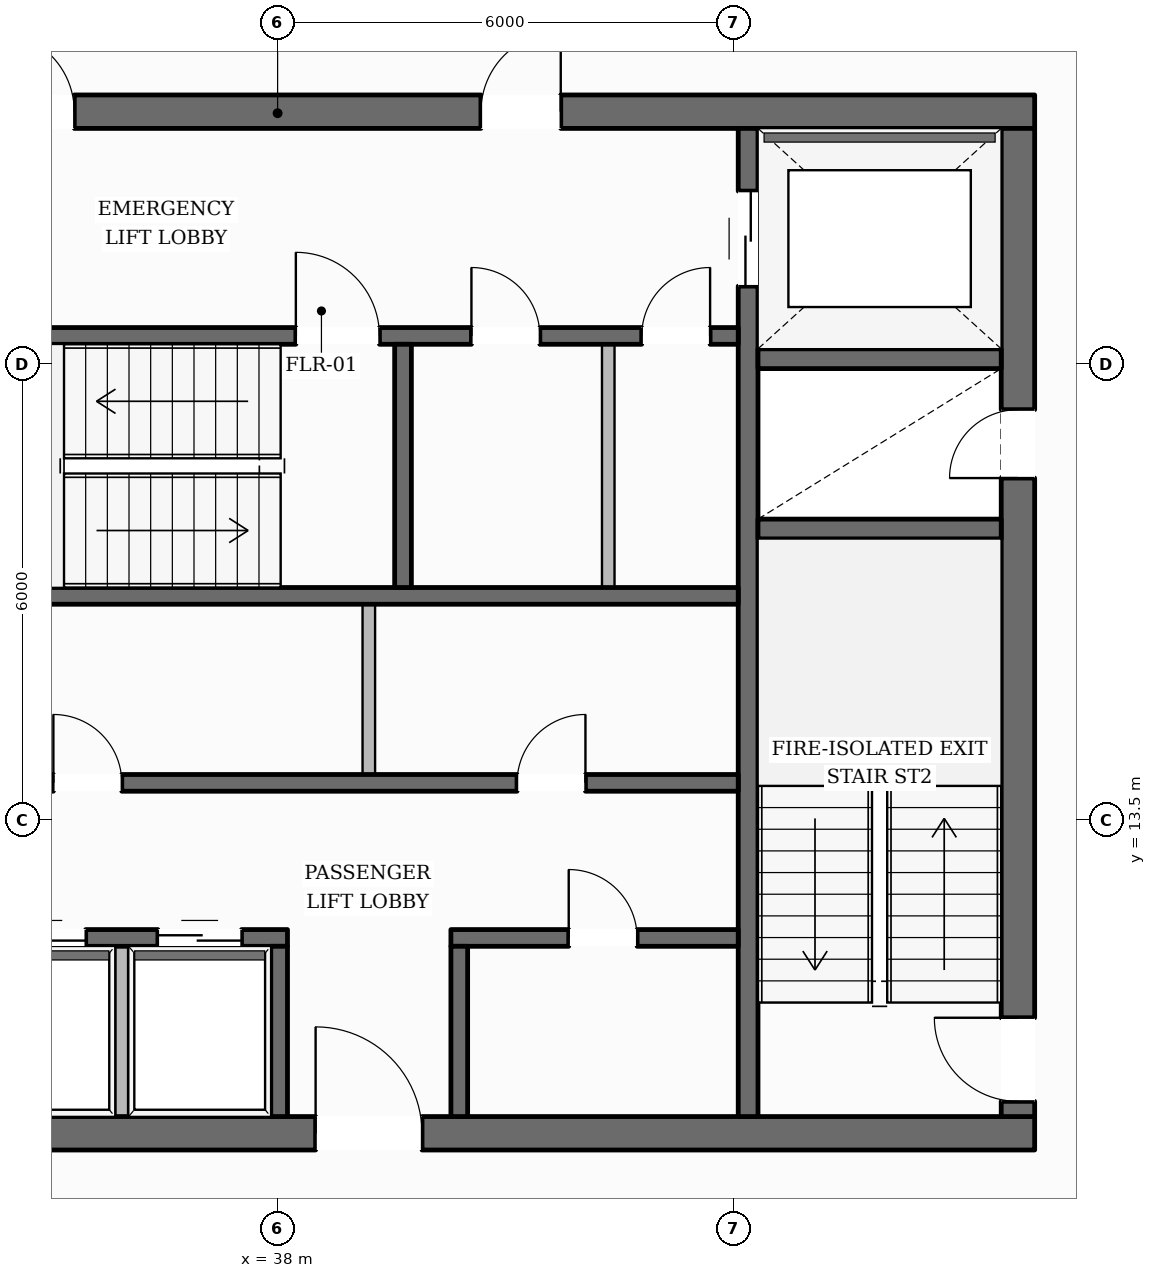
"""IFC4 building model, lengths in metres.
Left out: names, types, materials, properties, quantities, classifications, styles, units other than length and angle.
Written with IfcOpenShell. Run it as: python <this file> out.ifc"""

import sys

from ifc_helpers import new_model, si_unit, direction, frame, frame_2d, origin, place, context, subcontext, project, spatial, rectangle, extrude, element, fill, save


model = new_model("IFC4")
c1 = context("Model", 3, precision=1e-05, world=origin(), true_north=direction((0.0, 1.0)))
c2 = subcontext(c1, "Body", "Model", "MODEL_VIEW")
j1 = project(units=[si_unit("LENGTHUNIT", "METRE"), si_unit("PLANEANGLEUNIT", "RADIAN")], contexts=[c1])
p1 = place(None, origin())
s1 = spatial("IfcSite", under=j1, at=p1, CompositionType="ELEMENT")
p2 = place(p1, origin())
s2 = spatial("IfcBuilding", under=s1, at=p2, CompositionType="ELEMENT")
p3 = place(p2, frame((0.0, 0.0, 199.65)))
s3 = spatial("IfcBuildingStorey", under=s2, at=p3, CompositionType="ELEMENT", Elevation=199.65)
p4 = place(p3, frame((28.04, 9.38, 0.0), z_axis=(0.0, 0.0, 1.0), x_axis=(1.0, 0.0, 0.0)))
e1 = element("IfcWall", 1, at=p4, inside=s3, PredefinedType="SOLIDWALL", context=c2, shape_type="SweptSolid", body=[
    extrude(rectangle(XDim=19.92, YDim=0.44, at=frame_2d((9.96, 0.0))), origin(), (0.0, 0.0, 1.0), 3.6),
])
p5 = place(p4, frame((10.46, 0.0, 0.0)))
e2 = element("IfcOpeningElement", 2, at=p5, cuts=e1, PredefinedType="OPENING", context=c2, shape_type="SweptSolid", body=[
    extrude(rectangle(XDim=1.4, YDim=2.2, at=frame_2d((0.7, 1.1))), frame((0.0, 0.23, 0.0), z_axis=(0.0, -1.0, 0.0), x_axis=(1.0, 0.0, 0.0)), (0.0, 0.0, 1.0), 0.46),
])
p6 = place(p3, frame((28.04, 22.82, 0.0), z_axis=(0.0, 0.0, 1.0), x_axis=(1.0, 0.0, 0.0)))
e3 = element("IfcWall", 3, at=p6, inside=s3, PredefinedType="SOLIDWALL", context=c2, shape_type="SweptSolid", body=[
    extrude(rectangle(XDim=19.92, YDim=0.44, at=frame_2d((9.96, 0.0))), origin(), (0.0, 0.0, 1.0), 3.6),
])
p7 = place(p6, frame((6.235, 0.0, 0.0)))
e4 = element("IfcOpeningElement", 4, at=p7, cuts=e3, PredefinedType="OPENING", context=c2, shape_type="SweptSolid", body=[
    extrude(rectangle(XDim=1.05, YDim=2.15, at=frame_2d((0.525, 1.075))), frame((0.0, 0.23, 0.0), z_axis=(0.0, -1.0, 0.0), x_axis=(1.0, 0.0, 0.0)), (0.0, 0.0, 1.0), 0.46),
])
p8 = place(p6, frame((12.635, 0.0, 0.0)))
e5 = element("IfcOpeningElement", 5, at=p8, cuts=e3, PredefinedType="OPENING", context=c2, shape_type="SweptSolid", body=[
    extrude(rectangle(XDim=1.05, YDim=2.15, at=frame_2d((0.525, 1.075))), frame((0.0, 0.23, 0.0), z_axis=(0.0, -1.0, 0.0), x_axis=(1.0, 0.0, 0.0)), (0.0, 0.0, 1.0), 0.46),
])
p9 = place(p3, frame((47.74, 9.6, 0.0), z_axis=(0.0, 0.0, 1.0), x_axis=(0.0, 1.0, 0.0)))
e6 = element("IfcWall", 6, at=p9, inside=s3, PredefinedType="SOLIDWALL", context=c2, shape_type="SweptSolid", body=[
    extrude(rectangle(XDim=13.0, YDim=0.44, at=frame_2d((6.5, 0.0))), origin(), (0.0, 0.0, 1.0), 3.6),
])
p10 = place(p9, frame((0.2, 0.0, 0.0)))
e7 = element("IfcOpeningElement", 7, at=p10, cuts=e6, PredefinedType="OPENING", context=c2, shape_type="SweptSolid", body=[
    extrude(rectangle(XDim=1.1, YDim=2.15, at=frame_2d((0.55, 1.075))), frame((0.0, 0.23, 0.0), z_axis=(0.0, -1.0, 0.0), x_axis=(1.0, 0.0, 0.0)), (0.0, 0.0, 1.0), 0.46),
])
p11 = place(p9, frame((8.4, 0.0, 0.0)))
e8 = element("IfcOpeningElement", 8, at=p11, cuts=e6, PredefinedType="OPENING", context=c2, shape_type="SweptSolid", body=[
    extrude(rectangle(XDim=0.9, YDim=2.1, at=frame_2d((0.45, 1.05))), frame((0.0, 0.23, 0.0), z_axis=(0.0, -1.0, 0.0), x_axis=(1.0, 0.0, 0.0)), (0.0, 0.0, 1.0), 0.46),
])
p12 = place(p3, frame((44.19, 9.6, 0.0), z_axis=(0.0, 0.0, 1.0), x_axis=(0.0, 1.0, 0.0)))
e9 = element("IfcWall", 9, at=p12, inside=s3, PredefinedType="SHEAR", context=c2, shape_type="SweptSolid", body=[
    extrude(rectangle(XDim=13.0, YDim=0.26, at=frame_2d((6.5, 0.0))), origin(), (0.0, 0.0, 1.0), 3.6),
])
p13 = place(p12, frame((10.925, 0.0, 0.0)))
e10 = element("IfcOpeningElement", 10, at=p13, cuts=e9, PredefinedType="OPENING", context=c2, shape_type="SweptSolid", body=[
    extrude(rectangle(XDim=1.25, YDim=2.25, at=frame_2d((0.625, 1.125))), frame((0.0, 0.14, 0.0), z_axis=(0.0, -1.0, 0.0), x_axis=(1.0, 0.0, 0.0)), (0.0, 0.0, 1.0), 0.28),
])
for number, where, z_axis, x_axis in (
    (11, (44.32, 17.33, 0.0), (0.0, 0.0, 1.0), (1.0, 0.0, 0.0)),
    (12, (44.32, 19.57, 0.0), (0.0, 0.0, 1.0), (1.0, 0.0, 0.0)),
):
    element("IfcWall", number, at=place(p3, frame(where, z_axis=z_axis, x_axis=x_axis)), inside=s3, PredefinedType="SHEAR", context=c2, shape_type="SweptSolid", body=[
        extrude(rectangle(XDim=3.2, YDim=0.26, at=frame_2d((1.6, 0.0))), origin(), (0.0, 0.0, 1.0), 3.6),
    ])
p14 = place(p3, frame((31.94, 19.87, 0.0), z_axis=(0.0, 0.0, 1.0), x_axis=(1.0, 0.0, 0.0)))
e13 = element("IfcWall", 13, at=p14, inside=s3, PredefinedType="SOLIDWALL", context=c2, shape_type="SweptSolid", body=[
    extrude(rectangle(XDim=12.12, YDim=0.22, at=frame_2d((6.06, 0.0))), origin(), (0.0, 0.0, 1.0), 3.6),
])
p15 = place(p14, frame((6.3, 0.0, 0.0)))
e14 = element("IfcOpeningElement", 14, at=p15, cuts=e13, PredefinedType="OPENING", context=c2, shape_type="SweptSolid", body=[
    extrude(rectangle(XDim=1.1, YDim=2.15, at=frame_2d((0.55, 1.075))), frame((0.0, 0.12, 0.0), z_axis=(0.0, -1.0, 0.0), x_axis=(1.0, 0.0, 0.0)), (0.0, 0.0, 1.0), 0.24),
])
p16 = place(p14, frame((8.61, 0.0, 0.0)))
e15 = element("IfcOpeningElement", 15, at=p16, cuts=e13, PredefinedType="OPENING", context=c2, shape_type="SweptSolid", body=[
    extrude(rectangle(XDim=0.9, YDim=2.1, at=frame_2d((0.45, 1.05))), frame((0.0, 0.12, 0.0), z_axis=(0.0, -1.0, 0.0), x_axis=(1.0, 0.0, 0.0)), (0.0, 0.0, 1.0), 0.24),
])
p17 = place(p14, frame((10.85, 0.0, 0.0)))
e16 = element("IfcOpeningElement", 16, at=p17, cuts=e13, PredefinedType="OPENING", context=c2, shape_type="SweptSolid", body=[
    extrude(rectangle(XDim=0.9, YDim=2.1, at=frame_2d((0.45, 1.05))), frame((0.0, 0.12, 0.0), z_axis=(0.0, -1.0, 0.0), x_axis=(1.0, 0.0, 0.0)), (0.0, 0.0, 1.0), 0.24),
])
p18 = place(p3, frame((31.94, 16.45, 0.0), z_axis=(0.0, 0.0, 1.0), x_axis=(1.0, 0.0, 0.0)))
e17 = element("IfcWall", 17, at=p18, inside=s3, PredefinedType="SOLIDWALL", context=c2, shape_type="SweptSolid", body=[
    extrude(rectangle(XDim=12.12, YDim=0.22, at=frame_2d((6.06, 0.0))), origin(), (0.0, 0.0, 1.0), 3.6),
])
p19 = place(p3, frame((39.65, 16.56, 0.0), z_axis=(0.0, 0.0, 1.0), x_axis=(0.0, 1.0, 0.0)))
e18 = element("IfcWall", 18, at=p19, inside=s3, PredefinedType="SOLIDWALL", context=c2, shape_type="SweptSolid", body=[
    extrude(rectangle(XDim=3.2, YDim=0.22, at=frame_2d((1.6, 0.0))), origin(), (0.0, 0.0, 1.0), 3.6),
])
p20 = place(p3, frame((31.94, 13.99, 0.0), z_axis=(0.0, 0.0, 1.0), x_axis=(1.0, 0.0, 0.0)))
e19 = element("IfcWall", 19, at=p20, inside=s3, PredefinedType="SOLIDWALL", context=c2, shape_type="SweptSolid", body=[
    extrude(rectangle(XDim=12.12, YDim=0.22, at=frame_2d((6.06, 0.0))), origin(), (0.0, 0.0, 1.0), 3.6),
])
p21 = place(p20, frame((3.11, 0.0, 0.0)))
e20 = element("IfcOpeningElement", 20, at=p21, cuts=e19, PredefinedType="OPENING", context=c2, shape_type="SweptSolid", body=[
    extrude(rectangle(XDim=0.9, YDim=2.1, at=frame_2d((0.45, 1.05))), frame((0.0, 0.12, 0.0), z_axis=(0.0, -1.0, 0.0), x_axis=(1.0, 0.0, 0.0)), (0.0, 0.0, 1.0), 0.24),
])
p22 = place(p20, frame((9.21, 0.0, 0.0)))
e21 = element("IfcOpeningElement", 21, at=p22, cuts=e19, PredefinedType="OPENING", context=c2, shape_type="SweptSolid", body=[
    extrude(rectangle(XDim=0.9, YDim=2.1, at=frame_2d((0.45, 1.05))), frame((0.0, 0.12, 0.0), z_axis=(0.0, -1.0, 0.0), x_axis=(1.0, 0.0, 0.0)), (0.0, 0.0, 1.0), 0.24),
])
p23 = place(p3, frame((31.94, 11.95, 0.0), z_axis=(0.0, 0.0, 1.0), x_axis=(1.0, 0.0, 0.0)))
e22 = element("IfcWall", 22, at=p23, inside=s3, PredefinedType="SOLIDWALL", context=c2, shape_type="SweptSolid", body=[
    extrude(rectangle(XDim=6.19, YDim=0.22, at=frame_2d((3.095, 0.0))), origin(), (0.0, 0.0, 1.0), 3.6),
])
p24 = place(p23, frame((0.385, 0.0, 0.0)))
e23 = element("IfcOpeningElement", 23, at=p24, cuts=e22, PredefinedType="OPENING", context=c2, shape_type="SweptSolid", body=[
    extrude(rectangle(XDim=1.1, YDim=2.2, at=frame_2d((0.55, 1.1))), frame((0.0, 0.12, 0.0), z_axis=(0.0, -1.0, 0.0), x_axis=(1.0, 0.0, 0.0)), (0.0, 0.0, 1.0), 0.24),
])
p25 = place(p23, frame((2.435, 0.0, 0.0)))
e24 = element("IfcOpeningElement", 24, at=p25, cuts=e22, PredefinedType="OPENING", context=c2, shape_type="SweptSolid", body=[
    extrude(rectangle(XDim=1.1, YDim=2.2, at=frame_2d((0.55, 1.1))), frame((0.0, 0.12, 0.0), z_axis=(0.0, -1.0, 0.0), x_axis=(1.0, 0.0, 0.0)), (0.0, 0.0, 1.0), 0.24),
])
p26 = place(p23, frame((4.485, 0.0, 0.0)))
e25 = element("IfcOpeningElement", 25, at=p26, cuts=e22, PredefinedType="OPENING", context=c2, shape_type="SweptSolid", body=[
    extrude(rectangle(XDim=1.1, YDim=2.2, at=frame_2d((0.55, 1.1))), frame((0.0, 0.12, 0.0), z_axis=(0.0, -1.0, 0.0), x_axis=(1.0, 0.0, 0.0)), (0.0, 0.0, 1.0), 0.24),
])
p27 = place(p3, frame((40.28, 11.95, 0.0), z_axis=(0.0, 0.0, 1.0), x_axis=(1.0, 0.0, 0.0)))
e26 = element("IfcWall", 26, at=p27, inside=s3, PredefinedType="SOLIDWALL", context=c2, shape_type="SweptSolid", body=[
    extrude(rectangle(XDim=3.78, YDim=0.22, at=frame_2d((1.89, 0.0))), origin(), (0.0, 0.0, 1.0), 3.6),
])
p28 = place(p27, frame((1.55, 0.0, 0.0)))
e27 = element("IfcOpeningElement", 27, at=p28, cuts=e26, PredefinedType="OPENING", context=c2, shape_type="SweptSolid", body=[
    extrude(rectangle(XDim=0.9, YDim=2.1, at=frame_2d((0.45, 1.05))), frame((0.0, 0.12, 0.0), z_axis=(0.0, -1.0, 0.0), x_axis=(1.0, 0.0, 0.0)), (0.0, 0.0, 1.0), 0.24),
])
for number, where, z_axis, x_axis in (
    (28, (38.02, 9.6, 0.0), (0.0, 0.0, 1.0), (0.0, 1.0, 0.0)),
    (29, (40.39, 9.6, 0.0), (0.0, 0.0, 1.0), (0.0, 1.0, 0.0)),
):
    element("IfcWall", number, at=place(p3, frame(where, z_axis=z_axis, x_axis=x_axis)), inside=s3, PredefinedType="SOLIDWALL", context=c2, shape_type="SweptSolid", body=[
        extrude(rectangle(XDim=2.24, YDim=0.22, at=frame_2d((1.12, 0.0))), origin(), (0.0, 0.0, 1.0), 3.6),
    ])
p29 = place(p3, frame((42.36, 43.976, 0.0), z_axis=(0.0, 0.0, 1.0), x_axis=(0.508076618563, -0.861311877121, 0.0)))
e30 = element("IfcWall", 30, at=p29, inside=s3, PredefinedType="STANDARD", context=c2, shape_type="SweptSolid", body=[
    extrude(rectangle(XDim=38.079, YDim=0.35, at=frame_2d((19.04, 0.0))), origin(), (0.0, 0.0, 1.0), 3.132),
])
p30 = place(p29, frame((9.12, 0.0, 0.0)))
e31 = element("IfcOpeningElement", 31, at=p30, cuts=e30, PredefinedType="OPENING", context=c2, shape_type="SweptSolid", body=[
    extrude(rectangle(XDim=1.0, YDim=2.2, at=frame_2d((0.5, 1.1))), frame((0.0, 0.185, 0.0), z_axis=(0.0, -1.0, 0.0), x_axis=(1.0, 0.0, 0.0)), (0.0, 0.0, 1.0), 0.37),
])
p31 = place(p29, frame((33.779, 0.0, 0.65)))
e32 = element("IfcOpeningElement", 32, at=p31, cuts=e30, PredefinedType="OPENING", context=c2, shape_type="SweptSolid", body=[
    extrude(rectangle(XDim=1.45, YDim=1.75, at=frame_2d((0.725, 0.875))), frame((0.0, 0.185, 0.0), z_axis=(0.0, -1.0, 0.0), x_axis=(1.0, 0.0, 0.0)), (0.0, 0.0, 1.0), 0.37),
])
p32 = place(p29, frame((27.591, 0.0, 0.65)))
e33 = element("IfcOpeningElement", 33, at=p32, cuts=e30, PredefinedType="OPENING", context=c2, shape_type="SweptSolid", body=[
    extrude(rectangle(XDim=1.45, YDim=1.75, at=frame_2d((0.725, 0.875))), frame((0.0, 0.185, 0.0), z_axis=(0.0, -1.0, 0.0), x_axis=(1.0, 0.0, 0.0)), (0.0, 0.0, 1.0), 0.37),
])
p33 = place(p29, frame((21.404, 0.0, 0.65)))
e34 = element("IfcOpeningElement", 34, at=p33, cuts=e30, PredefinedType="OPENING", context=c2, shape_type="SweptSolid", body=[
    extrude(rectangle(XDim=1.45, YDim=1.75, at=frame_2d((0.725, 0.875))), frame((0.0, 0.185, 0.0), z_axis=(0.0, -1.0, 0.0), x_axis=(1.0, 0.0, 0.0)), (0.0, 0.0, 1.0), 0.37),
])
p34 = place(p29, frame((2.842, 0.0, 0.65)))
e35 = element("IfcOpeningElement", 35, at=p34, cuts=e30, PredefinedType="OPENING", context=c2, shape_type="SweptSolid", body=[
    extrude(rectangle(XDim=1.45, YDim=1.75, at=frame_2d((0.725, 0.875))), frame((0.0, 0.185, 0.0), z_axis=(0.0, -1.0, 0.0), x_axis=(1.0, 0.0, 0.0)), (0.0, 0.0, 1.0), 0.37),
])
p35 = place(p3, frame((35.95, 9.52, 0.0), z_axis=(0.0, 0.0, 1.0), x_axis=(0.0, 1.0, 0.0)))
e36 = element("IfcWall", 36, at=p35, inside=s3, PredefinedType="PARTITIONING", context=c2, shape_type="SweptSolid", body=[
    extrude(rectangle(XDim=2.32, YDim=0.165, at=frame_2d((1.16, 0.0))), origin(), (0.0, 0.0, 1.0), 3.6),
])
p36 = place(p3, frame((39.2, 14.1, 0.0), z_axis=(0.0, 0.0, 1.0), x_axis=(0.0, 1.0, 0.0)))
e37 = element("IfcWall", 37, at=p36, inside=s3, PredefinedType="PARTITIONING", context=c2, shape_type="SweptSolid", body=[
    extrude(rectangle(XDim=2.24, YDim=0.165, at=frame_2d((1.12, 0.0))), origin(), (0.0, 0.0, 1.0), 3.6),
])
p37 = place(p3, frame((42.35, 16.56, 0.0), z_axis=(0.0, 0.0, 1.0), x_axis=(0.0, 1.0, 0.0)))
e38 = element("IfcWall", 38, at=p37, inside=s3, PredefinedType="PARTITIONING", context=c2, shape_type="SweptSolid", body=[
    extrude(rectangle(XDim=3.2, YDim=0.165, at=frame_2d((1.6, 0.0))), origin(), (0.0, 0.0, 1.0), 3.6),
])
p38 = place(p10, origin())
e39 = element("IfcDoor", 39, at=p38, inside=s3, OperationType="SINGLE_SWING_RIGHT", PredefinedType="DOOR", context=c2, shape_type="SweptSolid", body=[
    extrude(rectangle(XDim=1.1, YDim=2.15, at=frame_2d((0.55, 1.075))), frame((0.0, 0.025, 0.0), z_axis=(0.0, -1.0, 0.0), x_axis=(1.0, 0.0, 0.0)), (0.0, 0.0, 1.0), 0.05),
])
fill(e7, e39)
p39 = place(p15, origin())
e40 = element("IfcDoor", 40, at=p39, inside=s3, OperationType="SINGLE_SWING_LEFT", PredefinedType="DOOR", context=c2, shape_type="SweptSolid", body=[
    extrude(rectangle(XDim=1.1, YDim=2.15, at=frame_2d((0.55, 1.075))), frame((0.0, 0.025, 0.0), z_axis=(0.0, -1.0, 0.0), x_axis=(1.0, 0.0, 0.0)), (0.0, 0.0, 1.0), 0.05),
])
fill(e14, e40)
p40 = place(p11, origin())
e41 = element("IfcDoor", 41, at=p40, inside=s3, OperationType="SINGLE_SWING_LEFT", PredefinedType="DOOR", context=c2, shape_type="SweptSolid", body=[
    extrude(rectangle(XDim=0.9, YDim=2.1, at=frame_2d((0.45, 1.05))), frame((0.0, 0.025, 0.0), z_axis=(0.0, -1.0, 0.0), x_axis=(1.0, 0.0, 0.0)), (0.0, 0.0, 1.0), 0.05),
])
fill(e8, e41)
p41 = place(p7, origin())
e42 = element("IfcDoor", 42, at=p41, inside=s3, OperationType="SINGLE_SWING_LEFT", PredefinedType="DOOR", context=c2, shape_type="SweptSolid", body=[
    extrude(rectangle(XDim=1.05, YDim=2.15, at=frame_2d((0.525, 1.075))), frame((0.0, 0.025, 0.0), z_axis=(0.0, -1.0, 0.0), x_axis=(1.0, 0.0, 0.0)), (0.0, 0.0, 1.0), 0.05),
])
fill(e4, e42)
p42 = place(p8, origin())
e43 = element("IfcDoor", 43, at=p42, inside=s3, OperationType="SINGLE_SWING_RIGHT", PredefinedType="DOOR", context=c2, shape_type="SweptSolid", body=[
    extrude(rectangle(XDim=1.05, YDim=2.15, at=frame_2d((0.525, 1.075))), frame((0.0, 0.025, 0.0), z_axis=(0.0, -1.0, 0.0), x_axis=(1.0, 0.0, 0.0)), (0.0, 0.0, 1.0), 0.05),
])
fill(e5, e43)
p43 = place(p13, origin())
e44 = element("IfcDoor", 44, at=p43, inside=s3, OperationType="DOUBLE_DOOR_SLIDING", PredefinedType="DOOR", context=c2, shape_type="SweptSolid", body=[
    extrude(rectangle(XDim=1.25, YDim=2.25, at=frame_2d((0.625, 1.125))), frame((0.0, 0.025, 0.0), z_axis=(0.0, -1.0, 0.0), x_axis=(1.0, 0.0, 0.0)), (0.0, 0.0, 1.0), 0.05),
])
fill(e10, e44)
p44 = place(p5, origin())
e45 = element("IfcDoor", 45, at=p44, inside=s3, OperationType="SINGLE_SWING_LEFT", PredefinedType="DOOR", context=c2, shape_type="SweptSolid", body=[
    extrude(rectangle(XDim=1.4, YDim=2.2, at=frame_2d((0.7, 1.1))), frame((0.0, 0.025, 0.0), z_axis=(0.0, -1.0, 0.0), x_axis=(1.0, 0.0, 0.0)), (0.0, 0.0, 1.0), 0.05),
])
fill(e2, e45)
p45 = place(p25, origin())
e46 = element("IfcDoor", 46, at=p45, inside=s3, OperationType="DOUBLE_DOOR_SLIDING", PredefinedType="DOOR", context=c2, shape_type="SweptSolid", body=[
    extrude(rectangle(XDim=1.1, YDim=2.2, at=frame_2d((0.55, 1.1))), frame((0.0, 0.025, 0.0), z_axis=(0.0, -1.0, 0.0), x_axis=(1.0, 0.0, 0.0)), (0.0, 0.0, 1.0), 0.05),
])
fill(e24, e46)
p46 = place(p26, origin())
e47 = element("IfcDoor", 47, at=p46, inside=s3, OperationType="DOUBLE_DOOR_SLIDING", PredefinedType="DOOR", context=c2, shape_type="SweptSolid", body=[
    extrude(rectangle(XDim=1.1, YDim=2.2, at=frame_2d((0.55, 1.1))), frame((0.0, 0.025, 0.0), z_axis=(0.0, -1.0, 0.0), x_axis=(1.0, 0.0, 0.0)), (0.0, 0.0, 1.0), 0.05),
])
fill(e25, e47)
p47 = place(p21, origin())
e48 = element("IfcDoor", 48, at=p47, inside=s3, OperationType="SINGLE_SWING_LEFT", PredefinedType="DOOR", context=c2, shape_type="SweptSolid", body=[
    extrude(rectangle(XDim=0.9, YDim=2.1, at=frame_2d((0.45, 1.05))), frame((0.0, 0.025, 0.0), z_axis=(0.0, -1.0, 0.0), x_axis=(1.0, 0.0, 0.0)), (0.0, 0.0, 1.0), 0.05),
])
fill(e20, e48)
p48 = place(p22, origin())
e49 = element("IfcDoor", 49, at=p48, inside=s3, OperationType="SINGLE_SWING_RIGHT", PredefinedType="DOOR", context=c2, shape_type="SweptSolid", body=[
    extrude(rectangle(XDim=0.9, YDim=2.1, at=frame_2d((0.45, 1.05))), frame((0.0, 0.025, 0.0), z_axis=(0.0, -1.0, 0.0), x_axis=(1.0, 0.0, 0.0)), (0.0, 0.0, 1.0), 0.05),
])
fill(e21, e49)
p49 = place(p16, origin())
e50 = element("IfcDoor", 50, at=p49, inside=s3, OperationType="SINGLE_SWING_LEFT", PredefinedType="DOOR", context=c2, shape_type="SweptSolid", body=[
    extrude(rectangle(XDim=0.9, YDim=2.1, at=frame_2d((0.45, 1.05))), frame((0.0, 0.025, 0.0), z_axis=(0.0, -1.0, 0.0), x_axis=(1.0, 0.0, 0.0)), (0.0, 0.0, 1.0), 0.05),
])
fill(e15, e50)
p50 = place(p17, origin())
e51 = element("IfcDoor", 51, at=p50, inside=s3, OperationType="SINGLE_SWING_RIGHT", PredefinedType="DOOR", context=c2, shape_type="SweptSolid", body=[
    extrude(rectangle(XDim=0.9, YDim=2.1, at=frame_2d((0.45, 1.05))), frame((0.0, 0.025, 0.0), z_axis=(0.0, -1.0, 0.0), x_axis=(1.0, 0.0, 0.0)), (0.0, 0.0, 1.0), 0.05),
])
fill(e16, e51)
p51 = place(p28, origin())
e52 = element("IfcDoor", 52, at=p51, inside=s3, OperationType="SINGLE_SWING_LEFT", PredefinedType="DOOR", context=c2, shape_type="SweptSolid", body=[
    extrude(rectangle(XDim=0.9, YDim=2.1, at=frame_2d((0.45, 1.05))), frame((0.0, 0.025, 0.0), z_axis=(0.0, -1.0, 0.0), x_axis=(1.0, 0.0, 0.0)), (0.0, 0.0, 1.0), 0.05),
])
fill(e27, e52)
save(model, sys.argv[1])
